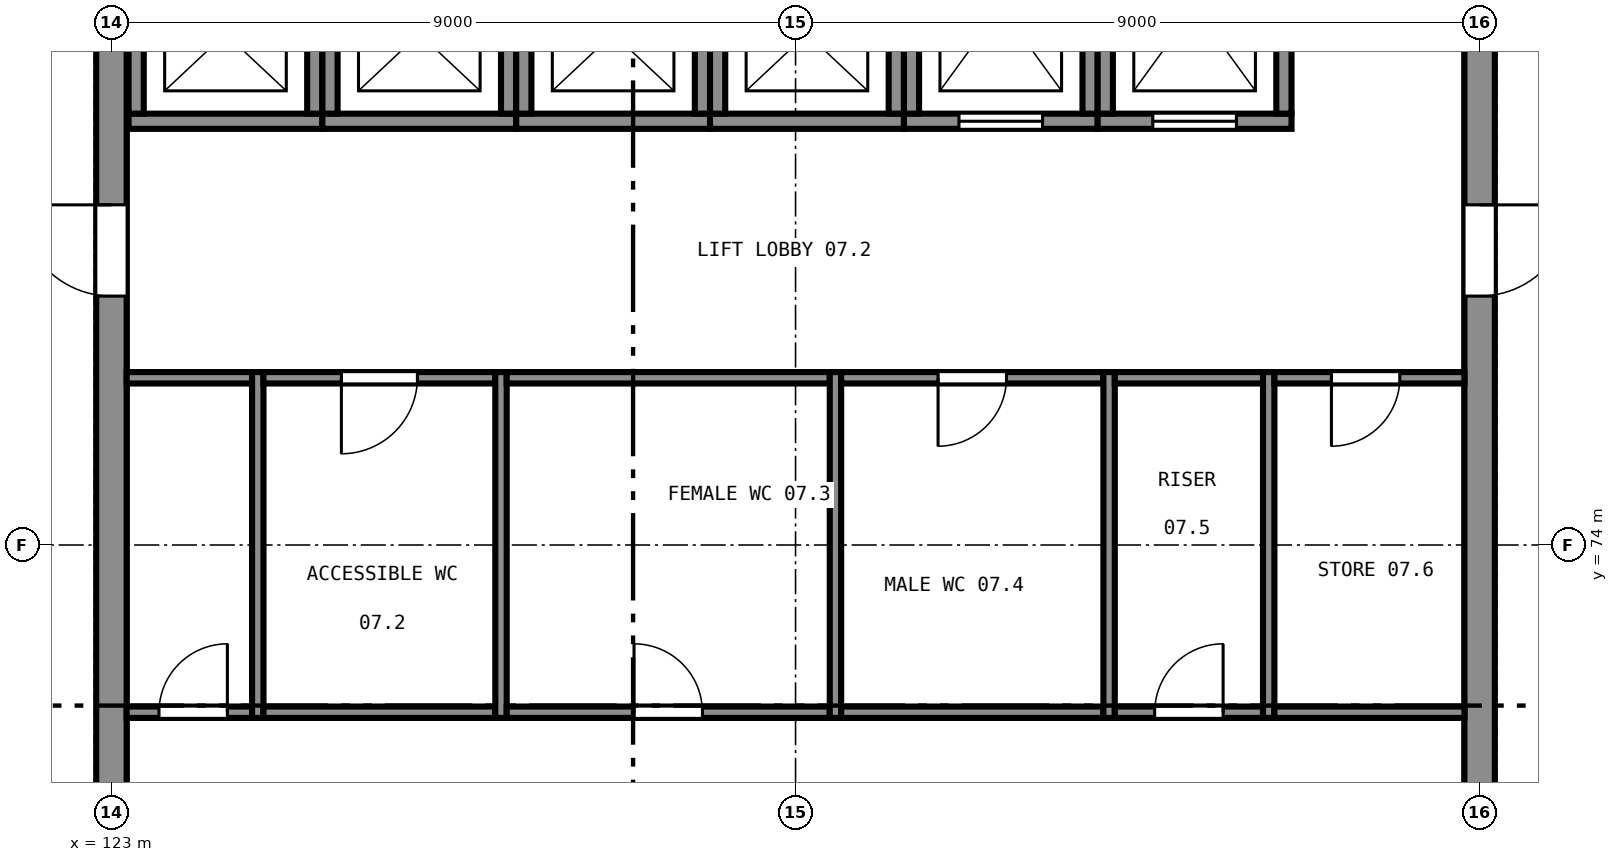
"""IFC4 building model, lengths in metres.
Left out: names, types, materials, properties, quantities, classifications, styles, units other than length and angle.
Written with IfcOpenShell. Run it as: python <this file> out.ifc"""

import sys

from ifc_helpers import new_model, si_unit, direction, frame, frame_2d, origin, place, context, subcontext, project, spatial, rectangle, extrude, element, fill, save


model = new_model("IFC4")
c1 = context("Model", 3, precision=1e-05, world=origin(), true_north=direction((0.0, 1.0)))
c2 = subcontext(c1, "Body", "Model", "MODEL_VIEW")
j1 = project(units=[si_unit("LENGTHUNIT", "METRE"), si_unit("PLANEANGLEUNIT", "RADIAN")], contexts=[c1])
p1 = place(None, origin())
s1 = spatial("IfcSite", under=j1, at=p1, CompositionType="ELEMENT")
p2 = place(p1, origin())
s2 = spatial("IfcBuilding", under=s1, at=p2, CompositionType="ELEMENT")
p3 = place(p2, frame((0.0, 0.0, 29.5)))
s3 = spatial("IfcBuildingStorey", under=s2, at=p3, CompositionType="ELEMENT", Elevation=29.5)
p4 = place(p3, frame((141.0, 65.2, 0.0), z_axis=(0.0, 0.0, 1.0), x_axis=(0.0, 1.0, 0.0)))
e1 = element("IfcWall", 1, at=p4, inside=s3, PredefinedType="SHEAR", context=c2, shape_type="SweptSolid", body=[
    extrude(rectangle(XDim=17.6, YDim=0.4, at=frame_2d((8.8, 0.0))), origin(), (0.0, 0.0, 1.0), 4.0),
])
p5 = place(p4, frame((4.325, 0.0, 0.0)))
e2 = element("IfcOpeningElement", 2, at=p5, cuts=e1, PredefinedType="OPENING", context=c2, shape_type="SweptSolid", body=[
    extrude(rectangle(XDim=1.2, YDim=2.1, at=frame_2d((0.6, 1.05))), frame((0.0, 0.21, 0.0), z_axis=(0.0, -1.0, 0.0), x_axis=(1.0, 0.0, 0.0)), (0.0, 0.0, 1.0), 0.42),
])
p6 = place(p4, frame((12.075, 0.0, 0.0)))
e3 = element("IfcOpeningElement", 3, at=p6, cuts=e1, PredefinedType="OPENING", context=c2, shape_type="SweptSolid", body=[
    extrude(rectangle(XDim=1.2, YDim=2.1, at=frame_2d((0.6, 1.05))), frame((0.0, 0.21, 0.0), z_axis=(0.0, -1.0, 0.0), x_axis=(1.0, 0.0, 0.0)), (0.0, 0.0, 1.0), 0.42),
])
p7 = place(p3, frame((123.0, 82.8, 0.0), z_axis=(0.0, 0.0, 1.0), x_axis=(0.0, -1.0, 0.0)))
e4 = element("IfcWall", 4, at=p7, inside=s3, PredefinedType="SHEAR", context=c2, shape_type="SweptSolid", body=[
    extrude(rectangle(XDim=17.6, YDim=0.4, at=frame_2d((8.8, 0.0))), origin(), (0.0, 0.0, 1.0), 4.0),
])
p8 = place(p7, frame((12.075, 0.0, 0.0)))
e5 = element("IfcOpeningElement", 5, at=p8, cuts=e4, PredefinedType="OPENING", context=c2, shape_type="SweptSolid", body=[
    extrude(rectangle(XDim=1.2, YDim=2.1, at=frame_2d((0.6, 1.05))), frame((0.0, 0.21, 0.0), z_axis=(0.0, -1.0, 0.0), x_axis=(1.0, 0.0, 0.0)), (0.0, 0.0, 1.0), 0.42),
])
p9 = place(p7, frame((4.325, 0.0, 0.0)))
e6 = element("IfcOpeningElement", 6, at=p9, cuts=e4, PredefinedType="OPENING", context=c2, shape_type="SweptSolid", body=[
    extrude(rectangle(XDim=1.2, YDim=2.1, at=frame_2d((0.6, 1.05))), frame((0.0, 0.21, 0.0), z_axis=(0.0, -1.0, 0.0), x_axis=(1.0, 0.0, 0.0)), (0.0, 0.0, 1.0), 0.42),
])
p10 = place(p3, frame((123.225, 79.575, 0.0), z_axis=(0.0, 0.0, 1.0), x_axis=(1.0, 0.0, 0.0)))
e7 = element("IfcWall", 7, at=p10, inside=s3, PredefinedType="SHEAR", context=c2, shape_type="SweptSolid", body=[
    extrude(rectangle(XDim=2.55, YDim=0.2, at=frame_2d((1.275, 0.0))), origin(), (0.0, 0.0, 1.0), 4.0),
])
for number, where, z_axis, x_axis in (
    (8, (125.675, 79.675, 0.0), (0.0, 0.0, 1.0), (0.0, 1.0, 0.0)),
    (9, (123.325, 81.775, 0.0), (0.0, 0.0, 1.0), (0.0, -1.0, 0.0)),
):
    element("IfcWall", number, at=place(p3, frame(where, z_axis=z_axis, x_axis=x_axis)), inside=s3, PredefinedType="SHEAR", context=c2, shape_type="SweptSolid", body=[
        extrude(rectangle(XDim=2.1, YDim=0.2, at=frame_2d((1.05, 0.0))), origin(), (0.0, 0.0, 1.0), 4.0),
    ])
p11 = place(p3, frame((125.775, 79.575, 0.0), z_axis=(0.0, 0.0, 1.0), x_axis=(1.0, 0.0, 0.0)))
e10 = element("IfcWall", 10, at=p11, inside=s3, PredefinedType="SHEAR", context=c2, shape_type="SweptSolid", body=[
    extrude(rectangle(XDim=2.55, YDim=0.2, at=frame_2d((1.275, 0.0))), origin(), (0.0, 0.0, 1.0), 4.0),
])
for number, where, z_axis, x_axis in (
    (11, (128.225, 79.675, 0.0), (0.0, 0.0, 1.0), (0.0, 1.0, 0.0)),
    (12, (125.875, 81.775, 0.0), (0.0, 0.0, 1.0), (0.0, -1.0, 0.0)),
):
    element("IfcWall", number, at=place(p3, frame(where, z_axis=z_axis, x_axis=x_axis)), inside=s3, PredefinedType="SHEAR", context=c2, shape_type="SweptSolid", body=[
        extrude(rectangle(XDim=2.1, YDim=0.2, at=frame_2d((1.05, 0.0))), origin(), (0.0, 0.0, 1.0), 4.0),
    ])
p12 = place(p3, frame((128.325, 79.575, 0.0), z_axis=(0.0, 0.0, 1.0), x_axis=(1.0, 0.0, 0.0)))
e13 = element("IfcWall", 13, at=p12, inside=s3, PredefinedType="SHEAR", context=c2, shape_type="SweptSolid", body=[
    extrude(rectangle(XDim=2.55, YDim=0.2, at=frame_2d((1.275, 0.0))), origin(), (0.0, 0.0, 1.0), 4.0),
])
for number, where, z_axis, x_axis in (
    (14, (130.775, 79.675, 0.0), (0.0, 0.0, 1.0), (0.0, 1.0, 0.0)),
    (15, (128.425, 81.775, 0.0), (0.0, 0.0, 1.0), (0.0, -1.0, 0.0)),
):
    element("IfcWall", number, at=place(p3, frame(where, z_axis=z_axis, x_axis=x_axis)), inside=s3, PredefinedType="SHEAR", context=c2, shape_type="SweptSolid", body=[
        extrude(rectangle(XDim=2.1, YDim=0.2, at=frame_2d((1.05, 0.0))), origin(), (0.0, 0.0, 1.0), 4.0),
    ])
p13 = place(p3, frame((130.875, 79.575, 0.0), z_axis=(0.0, 0.0, 1.0), x_axis=(1.0, 0.0, 0.0)))
e16 = element("IfcWall", 16, at=p13, inside=s3, PredefinedType="SHEAR", context=c2, shape_type="SweptSolid", body=[
    extrude(rectangle(XDim=2.55, YDim=0.2, at=frame_2d((1.275, 0.0))), origin(), (0.0, 0.0, 1.0), 4.0),
])
for number, where, z_axis, x_axis in (
    (17, (133.325, 79.675, 0.0), (0.0, 0.0, 1.0), (0.0, 1.0, 0.0)),
    (18, (130.975, 81.775, 0.0), (0.0, 0.0, 1.0), (0.0, -1.0, 0.0)),
):
    element("IfcWall", number, at=place(p3, frame(where, z_axis=z_axis, x_axis=x_axis)), inside=s3, PredefinedType="SHEAR", context=c2, shape_type="SweptSolid", body=[
        extrude(rectangle(XDim=2.1, YDim=0.2, at=frame_2d((1.05, 0.0))), origin(), (0.0, 0.0, 1.0), 4.0),
    ])
p14 = place(p3, frame((133.425, 79.575, 0.0), z_axis=(0.0, 0.0, 1.0), x_axis=(1.0, 0.0, 0.0)))
e19 = element("IfcWall", 19, at=p14, inside=s3, PredefinedType="SHEAR", context=c2, shape_type="SweptSolid", body=[
    extrude(rectangle(XDim=2.55, YDim=0.2, at=frame_2d((1.275, 0.0))), origin(), (0.0, 0.0, 1.0), 4.0),
])
p15 = place(p14, frame((0.725, 0.0, 0.0)))
e20 = element("IfcOpeningElement", 20, at=p15, cuts=e19, PredefinedType="OPENING", context=c2, shape_type="SweptSolid", body=[
    extrude(rectangle(XDim=1.1, YDim=2.1, at=frame_2d((0.55, 1.05))), frame((0.0, 0.11, 0.0), z_axis=(0.0, -1.0, 0.0), x_axis=(1.0, 0.0, 0.0)), (0.0, 0.0, 1.0), 0.22),
])
for number, where, z_axis, x_axis in (
    (21, (135.875, 79.675, 0.0), (0.0, 0.0, 1.0), (0.0, 1.0, 0.0)),
    (22, (133.525, 82.475, 0.0), (0.0, 0.0, 1.0), (0.0, -1.0, 0.0)),
):
    element("IfcWall", number, at=place(p3, frame(where, z_axis=z_axis, x_axis=x_axis)), inside=s3, PredefinedType="SHEAR", context=c2, shape_type="SweptSolid", body=[
        extrude(rectangle(XDim=2.8, YDim=0.2, at=frame_2d((1.4, 0.0))), origin(), (0.0, 0.0, 1.0), 4.0),
    ])
p16 = place(p3, frame((135.975, 79.575, 0.0), z_axis=(0.0, 0.0, 1.0), x_axis=(1.0, 0.0, 0.0)))
e23 = element("IfcWall", 23, at=p16, inside=s3, PredefinedType="SHEAR", context=c2, shape_type="SweptSolid", body=[
    extrude(rectangle(XDim=2.55, YDim=0.2, at=frame_2d((1.275, 0.0))), origin(), (0.0, 0.0, 1.0), 4.0),
])
p17 = place(p16, frame((0.725, 0.0, 0.0)))
e24 = element("IfcOpeningElement", 24, at=p17, cuts=e23, PredefinedType="OPENING", context=c2, shape_type="SweptSolid", body=[
    extrude(rectangle(XDim=1.1, YDim=2.1, at=frame_2d((0.55, 1.05))), frame((0.0, 0.11, 0.0), z_axis=(0.0, -1.0, 0.0), x_axis=(1.0, 0.0, 0.0)), (0.0, 0.0, 1.0), 0.22),
])
for number, where, z_axis, x_axis in (
    (25, (138.425, 79.675, 0.0), (0.0, 0.0, 1.0), (0.0, 1.0, 0.0)),
    (26, (136.075, 82.475, 0.0), (0.0, 0.0, 1.0), (0.0, -1.0, 0.0)),
):
    element("IfcWall", number, at=place(p3, frame(where, z_axis=z_axis, x_axis=x_axis)), inside=s3, PredefinedType="SHEAR", context=c2, shape_type="SweptSolid", body=[
        extrude(rectangle(XDim=2.8, YDim=0.2, at=frame_2d((1.4, 0.0))), origin(), (0.0, 0.0, 1.0), 4.0),
    ])
p18 = place(p3, frame((124.925, 71.725, 0.0), z_axis=(0.0, 0.0, 1.0), x_axis=(0.0, 1.0, 0.0)))
e27 = element("IfcWall", 27, at=p18, inside=s3, PredefinedType="PARTITIONING", context=c2, shape_type="SweptSolid", body=[
    extrude(rectangle(XDim=4.55, YDim=0.15, at=frame_2d((2.275, 0.0))), origin(), (0.0, 0.0, 1.0), 3.75),
])
p19 = place(p3, frame((123.2, 71.8, 0.0), z_axis=(0.0, 0.0, 1.0), x_axis=(1.0, 0.0, 0.0)))
e28 = element("IfcWall", 28, at=p19, inside=s3, PredefinedType="PARTITIONING", context=c2, shape_type="SweptSolid", body=[
    extrude(rectangle(XDim=1.65, YDim=0.15, at=frame_2d((0.825, 0.0))), origin(), (0.0, 0.0, 1.0), 3.75),
])
p20 = place(p19, frame((0.425, 0.0, 0.0)))
e29 = element("IfcOpeningElement", 29, at=p20, cuts=e28, PredefinedType="OPENING", context=c2, shape_type="SweptSolid", body=[
    extrude(rectangle(XDim=0.9, YDim=2.1, at=frame_2d((0.45, 1.05))), frame((0.0, 0.085, 0.0), z_axis=(0.0, -1.0, 0.0), x_axis=(1.0, 0.0, 0.0)), (0.0, 0.0, 1.0), 0.17),
])
p21 = place(p3, frame((123.2, 76.2, 0.0), z_axis=(0.0, 0.0, 1.0), x_axis=(1.0, 0.0, 0.0)))
e30 = element("IfcWall", 30, at=p21, inside=s3, PredefinedType="PARTITIONING", context=c2, shape_type="SweptSolid", body=[
    extrude(rectangle(XDim=1.65, YDim=0.15, at=frame_2d((0.825, 0.0))), origin(), (0.0, 0.0, 1.0), 3.75),
])
p22 = place(p3, frame((128.125, 71.725, 0.0), z_axis=(0.0, 0.0, 1.0), x_axis=(0.0, 1.0, 0.0)))
e31 = element("IfcWall", 31, at=p22, inside=s3, PredefinedType="PARTITIONING", context=c2, shape_type="SweptSolid", body=[
    extrude(rectangle(XDim=4.55, YDim=0.15, at=frame_2d((2.275, 0.0))), origin(), (0.0, 0.0, 1.0), 3.75),
])
p23 = place(p3, frame((125.0, 71.8, 0.0), z_axis=(0.0, 0.0, 1.0), x_axis=(1.0, 0.0, 0.0)))
e32 = element("IfcWall", 32, at=p23, inside=s3, PredefinedType="PARTITIONING", context=c2, shape_type="SweptSolid", body=[
    extrude(rectangle(XDim=3.05, YDim=0.15, at=frame_2d((1.525, 0.0))), origin(), (0.0, 0.0, 1.0), 3.75),
])
p24 = place(p3, frame((125.0, 76.2, 0.0), z_axis=(0.0, 0.0, 1.0), x_axis=(1.0, 0.0, 0.0)))
e33 = element("IfcWall", 33, at=p24, inside=s3, PredefinedType="PARTITIONING", context=c2, shape_type="SweptSolid", body=[
    extrude(rectangle(XDim=3.05, YDim=0.15, at=frame_2d((1.525, 0.0))), origin(), (0.0, 0.0, 1.0), 3.75),
])
p25 = place(p24, frame((1.025, 0.0, 0.0)))
e34 = element("IfcOpeningElement", 34, at=p25, cuts=e33, PredefinedType="OPENING", context=c2, shape_type="SweptSolid", body=[
    extrude(rectangle(XDim=1.0, YDim=2.1, at=frame_2d((0.5, 1.05))), frame((0.0, 0.085, 0.0), z_axis=(0.0, -1.0, 0.0), x_axis=(1.0, 0.0, 0.0)), (0.0, 0.0, 1.0), 0.17),
])
p26 = place(p3, frame((132.525, 71.725, 0.0), z_axis=(0.0, 0.0, 1.0), x_axis=(0.0, 1.0, 0.0)))
e35 = element("IfcWall", 35, at=p26, inside=s3, PredefinedType="PARTITIONING", context=c2, shape_type="SweptSolid", body=[
    extrude(rectangle(XDim=4.55, YDim=0.15, at=frame_2d((2.275, 0.0))), origin(), (0.0, 0.0, 1.0), 3.75),
])
p27 = place(p3, frame((128.2, 71.8, 0.0), z_axis=(0.0, 0.0, 1.0), x_axis=(1.0, 0.0, 0.0)))
e36 = element("IfcWall", 36, at=p27, inside=s3, PredefinedType="PARTITIONING", context=c2, shape_type="SweptSolid", body=[
    extrude(rectangle(XDim=4.25, YDim=0.15, at=frame_2d((2.125, 0.0))), origin(), (0.0, 0.0, 1.0), 3.75),
])
p28 = place(p27, frame((1.675, 0.0, 0.0)))
e37 = element("IfcOpeningElement", 37, at=p28, cuts=e36, PredefinedType="OPENING", context=c2, shape_type="SweptSolid", body=[
    extrude(rectangle(XDim=0.9, YDim=2.1, at=frame_2d((0.45, 1.05))), frame((0.0, 0.085, 0.0), z_axis=(0.0, -1.0, 0.0), x_axis=(1.0, 0.0, 0.0)), (0.0, 0.0, 1.0), 0.17),
])
p29 = place(p3, frame((128.2, 76.2, 0.0), z_axis=(0.0, 0.0, 1.0), x_axis=(1.0, 0.0, 0.0)))
e38 = element("IfcWall", 38, at=p29, inside=s3, PredefinedType="PARTITIONING", context=c2, shape_type="SweptSolid", body=[
    extrude(rectangle(XDim=4.25, YDim=0.15, at=frame_2d((2.125, 0.0))), origin(), (0.0, 0.0, 1.0), 3.75),
])
p30 = place(p3, frame((136.125, 71.725, 0.0), z_axis=(0.0, 0.0, 1.0), x_axis=(0.0, 1.0, 0.0)))
e39 = element("IfcWall", 39, at=p30, inside=s3, PredefinedType="PARTITIONING", context=c2, shape_type="SweptSolid", body=[
    extrude(rectangle(XDim=4.55, YDim=0.15, at=frame_2d((2.275, 0.0))), origin(), (0.0, 0.0, 1.0), 3.75),
])
p31 = place(p3, frame((132.6, 71.8, 0.0), z_axis=(0.0, 0.0, 1.0), x_axis=(1.0, 0.0, 0.0)))
e40 = element("IfcWall", 40, at=p31, inside=s3, PredefinedType="PARTITIONING", context=c2, shape_type="SweptSolid", body=[
    extrude(rectangle(XDim=3.45, YDim=0.15, at=frame_2d((1.725, 0.0))), origin(), (0.0, 0.0, 1.0), 3.75),
])
p32 = place(p3, frame((132.6, 76.2, 0.0), z_axis=(0.0, 0.0, 1.0), x_axis=(1.0, 0.0, 0.0)))
e41 = element("IfcWall", 41, at=p32, inside=s3, PredefinedType="PARTITIONING", context=c2, shape_type="SweptSolid", body=[
    extrude(rectangle(XDim=3.45, YDim=0.15, at=frame_2d((1.725, 0.0))), origin(), (0.0, 0.0, 1.0), 3.75),
])
p33 = place(p32, frame((1.275, 0.0, 0.0)))
e42 = element("IfcOpeningElement", 42, at=p33, cuts=e41, PredefinedType="OPENING", context=c2, shape_type="SweptSolid", body=[
    extrude(rectangle(XDim=0.9, YDim=2.1, at=frame_2d((0.45, 1.05))), frame((0.0, 0.085, 0.0), z_axis=(0.0, -1.0, 0.0), x_axis=(1.0, 0.0, 0.0)), (0.0, 0.0, 1.0), 0.17),
])
p34 = place(p3, frame((138.225, 71.725, 0.0), z_axis=(0.0, 0.0, 1.0), x_axis=(0.0, 1.0, 0.0)))
e43 = element("IfcWall", 43, at=p34, inside=s3, PredefinedType="PARTITIONING", context=c2, shape_type="SweptSolid", body=[
    extrude(rectangle(XDim=4.55, YDim=0.15, at=frame_2d((2.275, 0.0))), origin(), (0.0, 0.0, 1.0), 3.75),
])
p35 = place(p3, frame((136.2, 71.8, 0.0), z_axis=(0.0, 0.0, 1.0), x_axis=(1.0, 0.0, 0.0)))
e44 = element("IfcWall", 44, at=p35, inside=s3, PredefinedType="PARTITIONING", context=c2, shape_type="SweptSolid", body=[
    extrude(rectangle(XDim=1.95, YDim=0.15, at=frame_2d((0.975, 0.0))), origin(), (0.0, 0.0, 1.0), 3.75),
])
p36 = place(p35, frame((0.525, 0.0, 0.0)))
e45 = element("IfcOpeningElement", 45, at=p36, cuts=e44, PredefinedType="OPENING", context=c2, shape_type="SweptSolid", body=[
    extrude(rectangle(XDim=0.9, YDim=2.1, at=frame_2d((0.45, 1.05))), frame((0.0, 0.085, 0.0), z_axis=(0.0, -1.0, 0.0), x_axis=(1.0, 0.0, 0.0)), (0.0, 0.0, 1.0), 0.17),
])
p37 = place(p3, frame((136.2, 76.2, 0.0), z_axis=(0.0, 0.0, 1.0), x_axis=(1.0, 0.0, 0.0)))
e46 = element("IfcWall", 46, at=p37, inside=s3, PredefinedType="PARTITIONING", context=c2, shape_type="SweptSolid", body=[
    extrude(rectangle(XDim=1.95, YDim=0.15, at=frame_2d((0.975, 0.0))), origin(), (0.0, 0.0, 1.0), 3.75),
])
p38 = place(p3, frame((138.3, 71.8, 0.0), z_axis=(0.0, 0.0, 1.0), x_axis=(1.0, 0.0, 0.0)))
e47 = element("IfcWall", 47, at=p38, inside=s3, PredefinedType="PARTITIONING", context=c2, shape_type="SweptSolid", body=[
    extrude(rectangle(XDim=2.5, YDim=0.15, at=frame_2d((1.25, 0.0))), origin(), (0.0, 0.0, 1.0), 3.75),
])
p39 = place(p3, frame((138.3, 76.2, 0.0), z_axis=(0.0, 0.0, 1.0), x_axis=(1.0, 0.0, 0.0)))
e48 = element("IfcWall", 48, at=p39, inside=s3, PredefinedType="PARTITIONING", context=c2, shape_type="SweptSolid", body=[
    extrude(rectangle(XDim=2.5, YDim=0.15, at=frame_2d((1.25, 0.0))), origin(), (0.0, 0.0, 1.0), 3.75),
])
p40 = place(p39, frame((0.75, 0.0, 0.0)))
e49 = element("IfcOpeningElement", 49, at=p40, cuts=e48, PredefinedType="OPENING", context=c2, shape_type="SweptSolid", body=[
    extrude(rectangle(XDim=0.9, YDim=2.1, at=frame_2d((0.45, 1.05))), frame((0.0, 0.085, 0.0), z_axis=(0.0, -1.0, 0.0), x_axis=(1.0, 0.0, 0.0)), (0.0, 0.0, 1.0), 0.17),
])
p41 = place(p15, origin())
e50 = element("IfcDoor", 50, at=p41, inside=s3, OperationType="SLIDING_TO_LEFT", PredefinedType="DOOR", context=c2, shape_type="SweptSolid", body=[
    extrude(rectangle(XDim=1.1, YDim=2.1, at=frame_2d((0.55, 1.05))), frame((0.0, 0.025, 0.0), z_axis=(0.0, -1.0, 0.0), x_axis=(1.0, 0.0, 0.0)), (0.0, 0.0, 1.0), 0.05),
])
fill(e20, e50)
p42 = place(p17, origin())
e51 = element("IfcDoor", 51, at=p42, inside=s3, OperationType="SLIDING_TO_LEFT", PredefinedType="DOOR", context=c2, shape_type="SweptSolid", body=[
    extrude(rectangle(XDim=1.1, YDim=2.1, at=frame_2d((0.55, 1.05))), frame((0.0, 0.025, 0.0), z_axis=(0.0, -1.0, 0.0), x_axis=(1.0, 0.0, 0.0)), (0.0, 0.0, 1.0), 0.05),
])
fill(e24, e51)
p43 = place(p9, frame((1.2, 0.0, 0.0), z_axis=(0.0, 0.0, 1.0), x_axis=(-1.0, 0.0, 0.0)))
e52 = element("IfcDoor", 52, at=p43, inside=s3, OperationType="SINGLE_SWING_LEFT", PredefinedType="DOOR", context=c2, shape_type="SweptSolid", body=[
    extrude(rectangle(XDim=1.2, YDim=2.1, at=frame_2d((0.6, 1.05))), frame((0.0, 0.025, 0.0), z_axis=(0.0, -1.0, 0.0), x_axis=(1.0, 0.0, 0.0)), (0.0, 0.0, 1.0), 0.05),
])
fill(e6, e52)
p44 = place(p6, frame((1.2, 0.0, 0.0), z_axis=(0.0, 0.0, 1.0), x_axis=(-1.0, 0.0, 0.0)))
e53 = element("IfcDoor", 53, at=p44, inside=s3, OperationType="SINGLE_SWING_RIGHT", PredefinedType="DOOR", context=c2, shape_type="SweptSolid", body=[
    extrude(rectangle(XDim=1.2, YDim=2.1, at=frame_2d((0.6, 1.05))), frame((0.0, 0.025, 0.0), z_axis=(0.0, -1.0, 0.0), x_axis=(1.0, 0.0, 0.0)), (0.0, 0.0, 1.0), 0.05),
])
fill(e3, e53)
p45 = place(p20, origin())
e54 = element("IfcDoor", 54, at=p45, inside=s3, OperationType="SINGLE_SWING_LEFT", PredefinedType="DOOR", context=c2, shape_type="SweptSolid", body=[
    extrude(rectangle(XDim=0.9, YDim=2.1, at=frame_2d((0.45, 1.05))), frame((0.0, 0.025, 0.0), z_axis=(0.0, -1.0, 0.0), x_axis=(1.0, 0.0, 0.0)), (0.0, 0.0, 1.0), 0.05),
])
fill(e29, e54)
p46 = place(p25, frame((1.0, 0.0, 0.0), z_axis=(0.0, 0.0, 1.0), x_axis=(-1.0, 0.0, 0.0)))
e55 = element("IfcDoor", 55, at=p46, inside=s3, OperationType="SINGLE_SWING_LEFT", PredefinedType="DOOR", context=c2, shape_type="SweptSolid", body=[
    extrude(rectangle(XDim=1.0, YDim=2.1, at=frame_2d((0.5, 1.05))), frame((0.0, 0.025, 0.0), z_axis=(0.0, -1.0, 0.0), x_axis=(1.0, 0.0, 0.0)), (0.0, 0.0, 1.0), 0.05),
])
fill(e34, e55)
p47 = place(p28, origin())
e56 = element("IfcDoor", 56, at=p47, inside=s3, OperationType="SINGLE_SWING_RIGHT", PredefinedType="DOOR", context=c2, shape_type="SweptSolid", body=[
    extrude(rectangle(XDim=0.9, YDim=2.1, at=frame_2d((0.45, 1.05))), frame((0.0, 0.025, 0.0), z_axis=(0.0, -1.0, 0.0), x_axis=(1.0, 0.0, 0.0)), (0.0, 0.0, 1.0), 0.05),
])
fill(e37, e56)
p48 = place(p33, frame((0.9, 0.0, 0.0), z_axis=(0.0, 0.0, 1.0), x_axis=(-1.0, 0.0, 0.0)))
e57 = element("IfcDoor", 57, at=p48, inside=s3, OperationType="SINGLE_SWING_LEFT", PredefinedType="DOOR", context=c2, shape_type="SweptSolid", body=[
    extrude(rectangle(XDim=0.9, YDim=2.1, at=frame_2d((0.45, 1.05))), frame((0.0, 0.025, 0.0), z_axis=(0.0, -1.0, 0.0), x_axis=(1.0, 0.0, 0.0)), (0.0, 0.0, 1.0), 0.05),
])
fill(e42, e57)
p49 = place(p36, origin())
e58 = element("IfcDoor", 58, at=p49, inside=s3, OperationType="SINGLE_SWING_LEFT", PredefinedType="DOOR", context=c2, shape_type="SweptSolid", body=[
    extrude(rectangle(XDim=0.9, YDim=2.1, at=frame_2d((0.45, 1.05))), frame((0.0, 0.025, 0.0), z_axis=(0.0, -1.0, 0.0), x_axis=(1.0, 0.0, 0.0)), (0.0, 0.0, 1.0), 0.05),
])
fill(e45, e58)
p50 = place(p40, frame((0.9, 0.0, 0.0), z_axis=(0.0, 0.0, 1.0), x_axis=(-1.0, 0.0, 0.0)))
e59 = element("IfcDoor", 59, at=p50, inside=s3, OperationType="SINGLE_SWING_LEFT", PredefinedType="DOOR", context=c2, shape_type="SweptSolid", body=[
    extrude(rectangle(XDim=0.9, YDim=2.1, at=frame_2d((0.45, 1.05))), frame((0.0, 0.025, 0.0), z_axis=(0.0, -1.0, 0.0), x_axis=(1.0, 0.0, 0.0)), (0.0, 0.0, 1.0), 0.05),
])
fill(e49, e59)
save(model, sys.argv[1])
